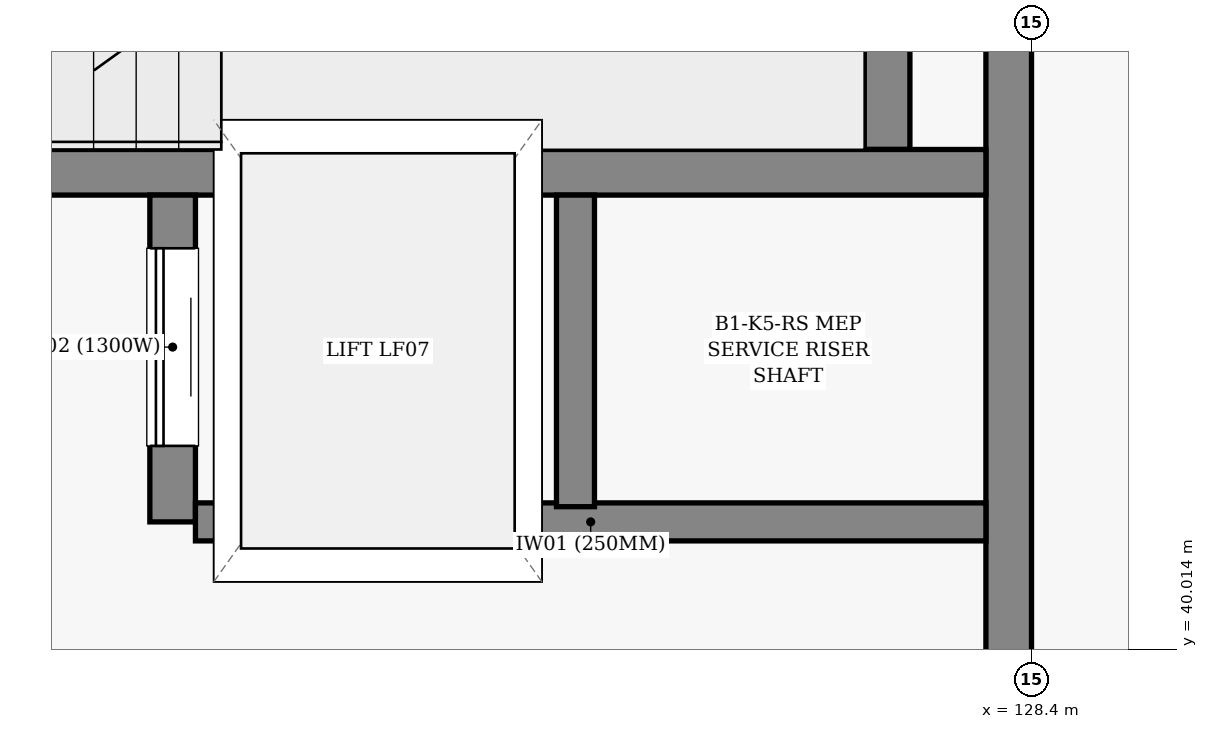
"""IFC4 building model, lengths in metres.
Left out: names, types, materials, properties, quantities, classifications, styles, units other than length and angle.
Written with IfcOpenShell. Run it as: python <this file> out.ifc"""

import sys

from ifc_helpers import new_model, si_unit, direction, frame, frame_2d, origin, place, context, subcontext, project, spatial, rectangle, extrude, element, fill, save


model = new_model("IFC4")
c1 = context("Model", 3, precision=1e-05, world=origin(), true_north=direction((0.0, 1.0)))
c2 = subcontext(c1, "Body", "Model", "MODEL_VIEW")
j1 = project(units=[si_unit("LENGTHUNIT", "METRE"), si_unit("PLANEANGLEUNIT", "RADIAN")], contexts=[c1])
p1 = place(None, origin())
s1 = spatial("IfcSite", under=j1, at=p1, CompositionType="ELEMENT")
p2 = place(p1, origin())
s2 = spatial("IfcBuilding", under=s1, at=p2, CompositionType="ELEMENT")
p3 = place(p2, frame((0.0, 0.0, -5.4)))
s3 = spatial("IfcBuildingStorey", under=s2, at=p3, CompositionType="ELEMENT", Elevation=-5.4)
p4 = place(p3, frame((128.25, 38.582, 0.0), z_axis=(0.0, 0.0, 1.0), x_axis=(0.0, 1.0, 0.0)))
e1 = element("IfcWall", 1, at=p4, inside=s3, PredefinedType="SHEAR", context=c2, shape_type="SweptSolid", body=[
    extrude(rectangle(XDim=8.036, YDim=0.3, at=frame_2d((4.018, 0.0))), origin(), (0.0, 0.0, 1.0), 5.12),
])
p5 = place(p3, frame((127.45, 43.3, 0.0), z_axis=(0.0, 0.0, 1.0), x_axis=(0.0, 1.0, 0.0)))
e2 = element("IfcWall", 2, at=p5, inside=s3, PredefinedType="SHEAR", context=c2, shape_type="SweptSolid", body=[
    extrude(rectangle(XDim=3.2, YDim=0.3, at=frame_2d((1.6, 0.0))), origin(), (0.0, 0.0, 1.0), 5.12),
])
p6 = place(p3, frame((116.7, 43.15, 0.0), z_axis=(0.0, 0.0, 1.0), x_axis=(1.0, 0.0, 0.0)))
e3 = element("IfcWall", 3, at=p6, inside=s3, PredefinedType="SHEAR", context=c2, shape_type="SweptSolid", body=[
    extrude(rectangle(XDim=11.4, YDim=0.3, at=frame_2d((5.7, 0.0))), origin(), (0.0, 0.0, 1.0), 5.12),
])
p7 = place(p6, frame((0.55, 0.0, 0.0)))
e4 = element("IfcOpeningElement", 4, at=p7, cuts=e3, PredefinedType="OPENING", context=c2, shape_type="SweptSolid", body=[
    extrude(rectangle(XDim=1.15, YDim=2.15, at=frame_2d((0.575, 1.075))), frame((0.0, 0.16, 0.0), z_axis=(0.0, -1.0, 0.0), x_axis=(1.0, 0.0, 0.0)), (0.0, 0.0, 1.0), 0.32),
])
p8 = place(p3, frame((122.75, 40.85, 0.0), z_axis=(0.0, 0.0, 1.0), x_axis=(0.0, 1.0, 0.0)))
e5 = element("IfcWall", 5, at=p8, inside=s3, PredefinedType="SHEAR", context=c2, shape_type="SweptSolid", body=[
    extrude(rectangle(XDim=2.15, YDim=0.3, at=frame_2d((1.075, 0.0))), origin(), (0.0, 0.0, 1.0), 5.12),
])
p9 = place(p8, frame((0.5, 0.0, 0.0)))
e6 = element("IfcOpeningElement", 6, at=p9, cuts=e5, PredefinedType="OPENING", context=c2, shape_type="SweptSolid", body=[
    extrude(rectangle(XDim=1.3, YDim=2.3, at=frame_2d((0.65, 1.15))), frame((0.0, 0.16, 0.0), z_axis=(0.0, -1.0, 0.0), x_axis=(1.0, 0.0, 0.0)), (0.0, 0.0, 1.0), 0.32),
])
p10 = place(p3, frame((122.9, 40.85, 0.0), z_axis=(0.0, 0.0, 1.0), x_axis=(1.0, 0.0, 0.0)))
e7 = element("IfcWall", 7, at=p10, inside=s3, PredefinedType="PARTITIONING", context=c2, shape_type="SweptSolid", body=[
    extrude(rectangle(XDim=5.2, YDim=0.25, at=frame_2d((2.6, 0.0))), origin(), (0.0, 0.0, 1.0), 4.025),
])
p11 = place(p3, frame((125.4, 40.95, 0.0), z_axis=(0.0, 0.0, 1.0), x_axis=(0.0, 1.0, 0.0)))
e8 = element("IfcWall", 8, at=p11, inside=s3, PredefinedType="PARTITIONING", context=c2, shape_type="SweptSolid", body=[
    extrude(rectangle(XDim=2.05, YDim=0.25, at=frame_2d((1.025, 0.0))), origin(), (0.0, 0.0, 1.0), 4.025),
])
p12 = place(p9, origin())
e9 = element("IfcDoor", 9, at=p12, inside=s3, OperationType="SLIDING_TO_LEFT", PredefinedType="DOOR", context=c2, shape_type="SweptSolid", body=[
    extrude(rectangle(XDim=1.3, YDim=2.3, at=frame_2d((0.65, 1.15))), frame((0.0, 0.025, 0.0), z_axis=(0.0, -1.0, 0.0), x_axis=(1.0, 0.0, 0.0)), (0.0, 0.0, 1.0), 0.05),
])
fill(e6, e9)
save(model, sys.argv[1])
